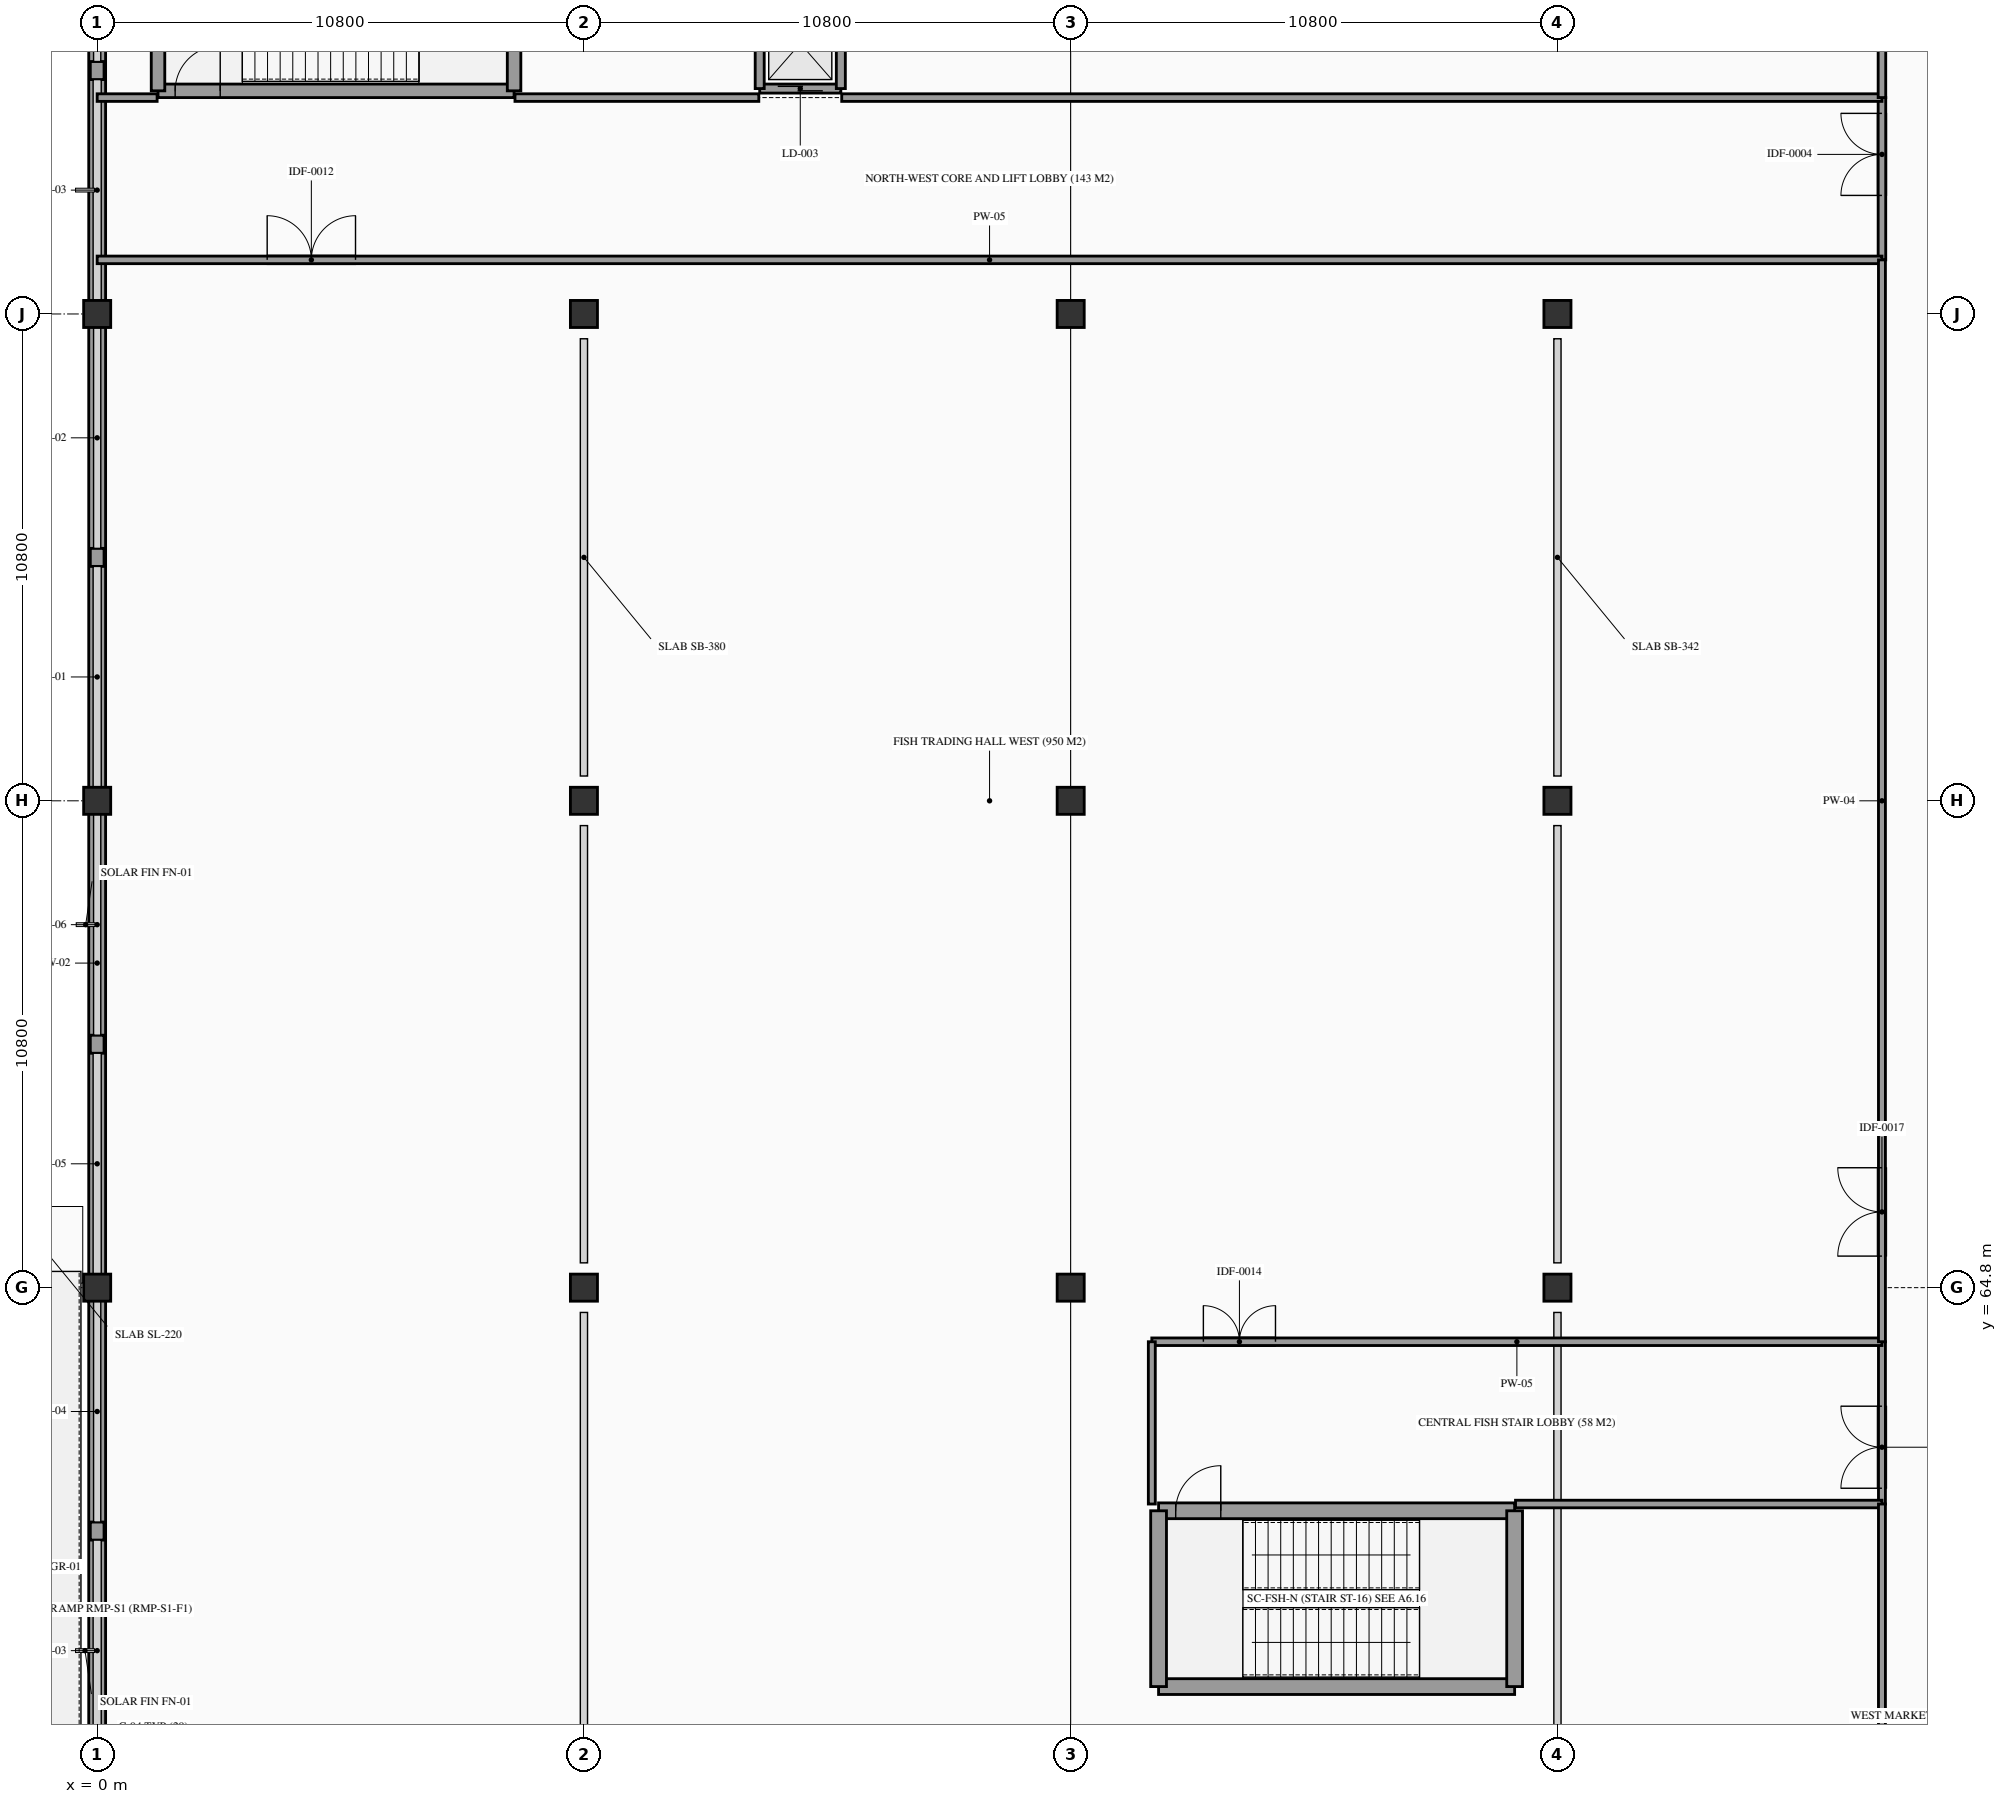
"""IFC4 building model, lengths in metres.
Left out: names, types, materials, properties, quantities, classifications, styles, units other than length and angle.
Written with IfcOpenShell. Run it as: python <this file> out.ifc"""

import sys

from ifc_helpers import new_model, si_unit, direction, frame, frame_2d, origin, origin_2d, place, context, subcontext, project, spatial, rectangle, extrude, element, fill, save


model = new_model("IFC4")
c1 = context("Model", 3, precision=1e-05, world=origin(), true_north=direction((0.0, 1.0)))
c2 = subcontext(c1, "Body", "Model", "MODEL_VIEW")
j1 = project(units=[si_unit("LENGTHUNIT", "METRE"), si_unit("PLANEANGLEUNIT", "RADIAN")], contexts=[c1])
p1 = place(None, origin())
s1 = spatial("IfcSite", under=j1, at=p1, CompositionType="ELEMENT")
p2 = place(p1, origin())
s2 = spatial("IfcBuilding", under=s1, at=p2, CompositionType="ELEMENT")
p3 = place(p2, origin())
s3 = spatial("IfcBuildingStorey", under=s2, at=p3, CompositionType="ELEMENT", Elevation=0.0)
for number, where, z_axis, x_axis in (
    (1, (0.0, 64.8, -1.2), (0.0, 0.0, 1.0), (1.0, 0.0, 0.0)),
    (2, (0.0, 75.6, -1.2), (0.0, 0.0, 1.0), (1.0, 0.0, 0.0)),
    (3, (0.0, 86.4, -1.2), (0.0, 0.0, 1.0), (1.0, 0.0, 0.0)),
    (4, (10.8, 64.8, -1.2), (0.0, 0.0, 1.0), (1.0, 0.0, 0.0)),
    (5, (10.8, 75.6, -1.2), (0.0, 0.0, 1.0), (1.0, 0.0, 0.0)),
    (6, (10.8, 86.4, -1.2), (0.0, 0.0, 1.0), (1.0, 0.0, 0.0)),
    (7, (21.6, 64.8, -1.2), (0.0, 0.0, 1.0), (1.0, 0.0, 0.0)),
    (8, (21.6, 75.6, -1.2), (0.0, 0.0, 1.0), (1.0, 0.0, 0.0)),
    (9, (21.6, 86.4, -1.2), (0.0, 0.0, 1.0), (1.0, 0.0, 0.0)),
    (10, (32.4, 64.8, -1.2), (0.0, 0.0, 1.0), (1.0, 0.0, 0.0)),
    (11, (32.4, 75.6, -1.2), (0.0, 0.0, 1.0), (1.0, 0.0, 0.0)),
    (12, (32.4, 86.4, -1.2), (0.0, 0.0, 1.0), (1.0, 0.0, 0.0)),
):
    element("IfcColumn", number, at=place(p3, frame(where, z_axis=z_axis, x_axis=x_axis)), inside=s3, PredefinedType="COLUMN", context=c2, shape_type="SweptSolid", body=[
        extrude(rectangle(XDim=0.6, YDim=0.6, at=origin_2d()), origin(), (0.0, 0.0, 1.0), 6.6),
    ])
p4 = place(p3, frame((0.0, 0.45, -1.2), z_axis=(0.0, 0.0, 1.0), x_axis=(0.0, 1.0, 0.0)))
e13 = element("IfcWall", 13, at=p4, inside=s3, PredefinedType="USERDEFINED", context=c2, shape_type="SweptSolid", body=[
    extrude(rectangle(XDim=128.7, YDim=0.374, at=frame_2d((64.35, 0.0))), origin(), (0.0, 0.0, 1.0), 0.14),
])
p5 = place(p3, frame((0.0, 59.2, 0.0), z_axis=(0.0, 0.0, 1.0), x_axis=(0.0, 1.0, 0.0)))
e14 = element("IfcWall", 14, at=p5, inside=s3, PredefinedType="STANDARD", context=c2, shape_type="SweptSolid", body=[
    extrude(rectangle(XDim=0.4, YDim=0.305, at=frame_2d((0.2, 0.0))), origin(), (0.0, 0.0, 1.0), 4.198),
])
for number, where, z_axis, x_axis in (
    (15, (0.0, 70.0, 0.0), (0.0, 0.0, 1.0), (0.0, 1.0, 0.0)),
    (16, (0.0, 80.8, 0.0), (0.0, 0.0, 1.0), (0.0, 1.0, 0.0)),
    (17, (0.0, 91.6, 0.0), (0.0, 0.0, 1.0), (0.0, 1.0, 0.0)),
):
    element("IfcWall", number, at=place(p3, frame(where, z_axis=z_axis, x_axis=x_axis)), inside=s3, PredefinedType="STANDARD", context=c2, shape_type="SweptSolid", body=[
        extrude(rectangle(XDim=0.4, YDim=0.305, at=frame_2d((0.2, 0.0))), origin(), (0.0, 0.0, 1.0), 4.25),
    ])
p6 = place(p3, frame((1.35, 91.35, 0.0), z_axis=(0.0, 0.0, 1.0), x_axis=(1.0, 0.0, 0.0)))
e18 = element("IfcWall", 18, at=p6, inside=s3, PredefinedType="SHEAR", context=c2, shape_type="SweptSolid", body=[
    extrude(rectangle(XDim=7.9, YDim=0.3, at=frame_2d((3.95, 0.0))), origin(), (0.0, 0.0, 1.0), 5.4),
])
p7 = place(p6, frame((0.38, 0.0, 0.0)))
e19 = element("IfcOpeningElement", 19, at=p7, cuts=e18, PredefinedType="OPENING", context=c2, shape_type="SweptSolid", body=[
    extrude(rectangle(XDim=1.0, YDim=2.15, at=frame_2d((0.5, 1.075))), frame((0.0, 0.16, 0.0), z_axis=(0.0, -1.0, 0.0), x_axis=(1.0, 0.0, 0.0)), (0.0, 0.0, 1.0), 0.32),
])
for number, where, z_axis, x_axis in (
    (20, (1.35, 91.35, 0.0), (0.0, 0.0, 1.0), (0.0, 1.0, 0.0)),
    (21, (9.25, 91.35, 0.0), (0.0, 0.0, 1.0), (0.0, 1.0, 0.0)),
):
    element("IfcWall", number, at=place(p3, frame(where, z_axis=z_axis, x_axis=x_axis)), inside=s3, PredefinedType="SHEAR", context=c2, shape_type="SweptSolid", body=[
        extrude(rectangle(XDim=3.9, YDim=0.3, at=frame_2d((1.95, 0.0))), origin(), (0.0, 0.0, 1.0), 5.4),
    ])
p8 = place(p3, frame((23.55, 55.95, 0.0), z_axis=(0.0, 0.0, 1.0), x_axis=(1.0, 0.0, 0.0)))
e22 = element("IfcWall", 22, at=p8, inside=s3, PredefinedType="SHEAR", context=c2, shape_type="SweptSolid", body=[
    extrude(rectangle(XDim=7.9, YDim=0.35, at=frame_2d((3.95, 0.0))), origin(), (0.0, 0.0, 1.0), 5.4),
])
p9 = place(p3, frame((23.55, 59.85, 0.0), z_axis=(0.0, 0.0, 1.0), x_axis=(1.0, 0.0, 0.0)))
e23 = element("IfcWall", 23, at=p9, inside=s3, PredefinedType="SHEAR", context=c2, shape_type="SweptSolid", body=[
    extrude(rectangle(XDim=7.9, YDim=0.35, at=frame_2d((3.95, 0.0))), origin(), (0.0, 0.0, 1.0), 5.4),
])
p10 = place(p9, frame((0.38, 0.0, 0.0)))
e24 = element("IfcOpeningElement", 24, at=p10, cuts=e23, PredefinedType="OPENING", context=c2, shape_type="SweptSolid", body=[
    extrude(rectangle(XDim=1.0, YDim=2.15, at=frame_2d((0.5, 1.075))), frame((0.0, 0.185, 0.0), z_axis=(0.0, -1.0, 0.0), x_axis=(1.0, 0.0, 0.0)), (0.0, 0.0, 1.0), 0.37),
])
for number, where, z_axis, x_axis in (
    (25, (23.55, 55.95, 0.0), (0.0, 0.0, 1.0), (0.0, 1.0, 0.0)),
    (26, (31.45, 55.95, 0.0), (0.0, 0.0, 1.0), (0.0, 1.0, 0.0)),
):
    element("IfcWall", number, at=place(p3, frame(where, z_axis=z_axis, x_axis=x_axis)), inside=s3, PredefinedType="SHEAR", context=c2, shape_type="SweptSolid", body=[
        extrude(rectangle(XDim=3.9, YDim=0.35, at=frame_2d((1.95, 0.0))), origin(), (0.0, 0.0, 1.0), 5.4),
    ])
p11 = place(p3, frame((14.7, 91.4, 0.0), z_axis=(0.0, 0.0, 1.0), x_axis=(1.0, 0.0, 0.0)))
e27 = element("IfcWall", 27, at=p11, inside=s3, PredefinedType="SOLIDWALL", context=c2, shape_type="SweptSolid", body=[
    extrude(rectangle(XDim=1.8, YDim=0.2, at=frame_2d((0.9, 0.0))), origin(), (0.0, 0.0, 1.0), 4.22),
])
p12 = place(p11, frame((0.4, 0.0, 0.0)))
e28 = element("IfcOpeningElement", 28, at=p12, cuts=e27, PredefinedType="OPENING", context=c2, shape_type="SweptSolid", body=[
    extrude(rectangle(XDim=1.0, YDim=2.15, at=frame_2d((0.5, 1.075))), frame((0.0, 0.11, 0.0), z_axis=(0.0, -1.0, 0.0), x_axis=(1.0, 0.0, 0.0)), (0.0, 0.0, 1.0), 0.22),
])
for number, where, z_axis, x_axis in (
    (29, (14.7, 91.4, 0.0), (0.0, 0.0, 1.0), (0.0, 1.0, 0.0)),
    (30, (16.5, 91.4, 0.0), (0.0, 0.0, 1.0), (0.0, 1.0, 0.0)),
):
    element("IfcWall", number, at=place(p3, frame(where, z_axis=z_axis, x_axis=x_axis)), inside=s3, PredefinedType="SOLIDWALL", context=c2, shape_type="SweptSolid", body=[
        extrude(rectangle(XDim=2.0, YDim=0.2, at=frame_2d((1.0, 0.0))), origin(), (0.0, 0.0, 1.0), 4.22),
    ])
p13 = place(p3, frame((39.6, 60.0, 0.0), z_axis=(0.0, 0.0, 1.0), x_axis=(0.0, 1.0, 0.0)))
e31 = element("IfcWall", 31, at=p13, inside=s3, PredefinedType="PARTITIONING", context=c2, shape_type="SweptSolid", body=[
    extrude(rectangle(XDim=3.6, YDim=0.154, at=frame_2d((1.8, 0.0))), origin(), (0.0, 0.0, 1.0), 3.95),
])
p14 = place(p13, frame((0.35, 0.0, 0.0)))
e32 = element("IfcOpeningElement", 32, at=p14, cuts=e31, PredefinedType="OPENING", context=c2, shape_type="SweptSolid", body=[
    extrude(rectangle(XDim=1.82, YDim=2.25, at=frame_2d((0.91, 1.125))), frame((0.0, 0.087, 0.0), z_axis=(0.0, -1.0, 0.0), x_axis=(1.0, 0.0, 0.0)), (0.0, 0.0, 1.0), 0.174),
])
p15 = place(p3, frame((39.6, 87.6, 0.0), z_axis=(0.0, 0.0, 1.0), x_axis=(0.0, 1.0, 0.0)))
e33 = element("IfcWall", 33, at=p15, inside=s3, PredefinedType="PARTITIONING", context=c2, shape_type="SweptSolid", body=[
    extrude(rectangle(XDim=3.6, YDim=0.168, at=frame_2d((1.8, 0.0))), origin(), (0.0, 0.0, 1.0), 3.95),
])
p16 = place(p15, frame((1.43, 0.0, 0.0)))
e34 = element("IfcOpeningElement", 34, at=p16, cuts=e33, PredefinedType="OPENING", context=c2, shape_type="SweptSolid", body=[
    extrude(rectangle(XDim=1.82, YDim=2.25, at=frame_2d((0.91, 1.125))), frame((0.0, 0.094, 0.0), z_axis=(0.0, -1.0, 0.0), x_axis=(1.0, 0.0, 0.0)), (0.0, 0.0, 1.0), 0.188),
])
p17 = place(p3, frame((0.0, 87.6, 0.0), z_axis=(0.0, 0.0, 1.0), x_axis=(1.0, 0.0, 0.0)))
e35 = element("IfcWall", 35, at=p17, inside=s3, PredefinedType="PARTITIONING", context=c2, shape_type="SweptSolid", body=[
    extrude(rectangle(XDim=39.6, YDim=0.168, at=frame_2d((19.8, 0.0))), origin(), (0.0, 0.0, 1.0), 3.95),
])
p18 = place(p17, frame((3.772, 0.0, 0.0)))
e36 = element("IfcOpeningElement", 36, at=p18, cuts=e35, PredefinedType="OPENING", context=c2, shape_type="SweptSolid", body=[
    extrude(rectangle(XDim=1.96, YDim=2.3, at=frame_2d((0.98, 1.15))), frame((0.0, 0.094, 0.0), z_axis=(0.0, -1.0, 0.0), x_axis=(1.0, 0.0, 0.0)), (0.0, 0.0, 1.0), 0.188),
])
p19 = place(p3, frame((23.4, 63.6, 0.0), z_axis=(0.0, 0.0, 1.0), x_axis=(1.0, 0.0, 0.0)))
e37 = element("IfcWall", 37, at=p19, inside=s3, PredefinedType="PARTITIONING", context=c2, shape_type="SweptSolid", body=[
    extrude(rectangle(XDim=16.2, YDim=0.168, at=frame_2d((8.1, 0.0))), origin(), (0.0, 0.0, 1.0), 3.95),
])
p20 = place(p19, frame((1.144, 0.0, 0.0)))
e38 = element("IfcOpeningElement", 38, at=p20, cuts=e37, PredefinedType="OPENING", context=c2, shape_type="SweptSolid", body=[
    extrude(rectangle(XDim=1.6, YDim=2.2, at=frame_2d((0.8, 1.1))), frame((0.0, 0.094, 0.0), z_axis=(0.0, -1.0, 0.0), x_axis=(1.0, 0.0, 0.0)), (0.0, 0.0, 1.0), 0.188),
])
p21 = place(p3, frame((39.6, 63.6, 0.0), z_axis=(0.0, 0.0, 1.0), x_axis=(0.0, 1.0, 0.0)))
e39 = element("IfcWall", 39, at=p21, inside=s3, PredefinedType="PARTITIONING", context=c2, shape_type="SweptSolid", body=[
    extrude(rectangle(XDim=24.0, YDim=0.154, at=frame_2d((12.0, 0.0))), origin(), (0.0, 0.0, 1.0), 3.95),
])
p22 = place(p21, frame((1.9, 0.0, 0.0)))
e40 = element("IfcOpeningElement", 40, at=p22, cuts=e39, PredefinedType="OPENING", context=c2, shape_type="SweptSolid", body=[
    extrude(rectangle(XDim=1.96, YDim=2.3, at=frame_2d((0.98, 1.15))), frame((0.0, 0.087, 0.0), z_axis=(0.0, -1.0, 0.0), x_axis=(1.0, 0.0, 0.0)), (0.0, 0.0, 1.0), 0.174),
])
p23 = place(p3, frame((0.0, 91.2, 0.0), z_axis=(0.0, 0.0, 1.0), x_axis=(1.0, 0.0, 0.0)))
e41 = element("IfcWall", 41, at=p23, inside=s3, PredefinedType="PARTITIONING", context=c2, shape_type="SweptSolid", body=[
    extrude(rectangle(XDim=1.33, YDim=0.168, at=frame_2d((0.665, 0.0))), origin(), (0.0, 0.0, 1.0), 3.95),
])
p24 = place(p3, frame((9.27, 91.2, 0.0), z_axis=(0.0, 0.0, 1.0), x_axis=(1.0, 0.0, 0.0)))
e42 = element("IfcWall", 42, at=p24, inside=s3, PredefinedType="PARTITIONING", context=c2, shape_type="SweptSolid", body=[
    extrude(rectangle(XDim=5.41, YDim=0.168, at=frame_2d((2.705, 0.0))), origin(), (0.0, 0.0, 1.0), 3.95),
])
p25 = place(p3, frame((16.52, 91.2, 0.0), z_axis=(0.0, 0.0, 1.0), x_axis=(1.0, 0.0, 0.0)))
e43 = element("IfcWall", 43, at=p25, inside=s3, PredefinedType="PARTITIONING", context=c2, shape_type="SweptSolid", body=[
    extrude(rectangle(XDim=23.08, YDim=0.168, at=frame_2d((11.54, 0.0))), origin(), (0.0, 0.0, 1.0), 3.95),
])
p26 = place(p3, frame((31.47, 60.0, 0.0), z_axis=(0.0, 0.0, 1.0), x_axis=(1.0, 0.0, 0.0)))
e44 = element("IfcWall", 44, at=p26, inside=s3, PredefinedType="PARTITIONING", context=c2, shape_type="SweptSolid", body=[
    extrude(rectangle(XDim=8.13, YDim=0.168, at=frame_2d((4.065, 0.0))), origin(), (0.0, 0.0, 1.0), 3.95),
])
p27 = place(p3, frame((23.4, 60.0, 0.0), z_axis=(0.0, 0.0, 1.0), x_axis=(0.0, 1.0, 0.0)))
e45 = element("IfcWall", 45, at=p27, inside=s3, PredefinedType="PARTITIONING", context=c2, shape_type="SweptSolid", body=[
    extrude(rectangle(XDim=3.6, YDim=0.154, at=frame_2d((1.8, 0.0))), origin(), (0.0, 0.0, 1.0), 3.95),
])
p28 = place(p3, frame((39.6, 54.0, 0.0), z_axis=(0.0, 0.0, 1.0), x_axis=(0.0, 1.0, 0.0)))
e46 = element("IfcWall", 46, at=p28, inside=s3, PredefinedType="PARTITIONING", context=c2, shape_type="SweptSolid", body=[
    extrude(rectangle(XDim=6.0, YDim=0.154, at=frame_2d((3.0, 0.0))), origin(), (0.0, 0.0, 1.0), 3.95),
])
p29 = place(p3, frame((39.6, 91.2, 0.0), z_axis=(0.0, 0.0, 1.0), x_axis=(0.0, 1.0, 0.0)))
e47 = element("IfcWall", 47, at=p29, inside=s3, PredefinedType="PARTITIONING", context=c2, shape_type="SweptSolid", body=[
    extrude(rectangle(XDim=6.0, YDim=0.168, at=frame_2d((3.0, 0.0))), origin(), (0.0, 0.0, 1.0), 3.95),
])
p30 = place(p7, origin())
e48 = element("IfcDoor", 48, at=p30, inside=s3, OperationType="SINGLE_SWING_RIGHT", PredefinedType="DOOR", context=c2, shape_type="SweptSolid", body=[
    extrude(rectangle(XDim=1.0, YDim=2.15, at=frame_2d((0.5, 1.075))), frame((0.0, 0.025, 0.0), z_axis=(0.0, -1.0, 0.0), x_axis=(1.0, 0.0, 0.0)), (0.0, 0.0, 1.0), 0.05),
])
fill(e19, e48)
p31 = place(p10, frame((1.0, 0.0, 0.0), z_axis=(0.0, 0.0, 1.0), x_axis=(-1.0, 0.0, 0.0)))
e49 = element("IfcDoor", 49, at=p31, inside=s3, OperationType="SINGLE_SWING_RIGHT", PredefinedType="DOOR", context=c2, shape_type="SweptSolid", body=[
    extrude(rectangle(XDim=1.0, YDim=2.15, at=frame_2d((0.5, 1.075))), frame((0.0, 0.025, 0.0), z_axis=(0.0, -1.0, 0.0), x_axis=(1.0, 0.0, 0.0)), (0.0, 0.0, 1.0), 0.05),
])
fill(e24, e49)
p32 = place(p12, origin())
e50 = element("IfcDoor", 50, at=p32, inside=s3, OperationType="DOUBLE_DOOR_SLIDING", PredefinedType="DOOR", context=c2, shape_type="SweptSolid", body=[
    extrude(rectangle(XDim=1.0, YDim=2.15, at=frame_2d((0.5, 1.075))), frame((0.0, 0.025, 0.0), z_axis=(0.0, -1.0, 0.0), x_axis=(1.0, 0.0, 0.0)), (0.0, 0.0, 1.0), 0.05),
])
fill(e28, e50)
p33 = place(p14, frame((1.82, 0.0, 0.0), z_axis=(0.0, 0.0, 1.0), x_axis=(-1.0, 0.0, 0.0)))
e51 = element("IfcDoor", 51, at=p33, inside=s3, OperationType="DOUBLE_DOOR_SINGLE_SWING", PredefinedType="DOOR", context=c2, shape_type="SweptSolid", body=[
    extrude(rectangle(XDim=1.82, YDim=2.25, at=frame_2d((0.91, 1.125))), frame((0.0, 0.025, 0.0), z_axis=(0.0, -1.0, 0.0), x_axis=(1.0, 0.0, 0.0)), (0.0, 0.0, 1.0), 0.05),
])
fill(e32, e51)
p34 = place(p16, origin())
e52 = element("IfcDoor", 52, at=p34, inside=s3, OperationType="DOUBLE_DOOR_SINGLE_SWING", PredefinedType="DOOR", context=c2, shape_type="SweptSolid", body=[
    extrude(rectangle(XDim=1.82, YDim=2.25, at=frame_2d((0.91, 1.125))), frame((0.0, 0.025, 0.0), z_axis=(0.0, -1.0, 0.0), x_axis=(1.0, 0.0, 0.0)), (0.0, 0.0, 1.0), 0.05),
])
fill(e34, e52)
p35 = place(p18, frame((1.96, 0.0, 0.0), z_axis=(0.0, 0.0, 1.0), x_axis=(-1.0, 0.0, 0.0)))
e53 = element("IfcDoor", 53, at=p35, inside=s3, OperationType="DOUBLE_DOOR_SINGLE_SWING", PredefinedType="DOOR", context=c2, shape_type="SweptSolid", body=[
    extrude(rectangle(XDim=1.96, YDim=2.3, at=frame_2d((0.98, 1.15))), frame((0.0, 0.025, 0.0), z_axis=(0.0, -1.0, 0.0), x_axis=(1.0, 0.0, 0.0)), (0.0, 0.0, 1.0), 0.05),
])
fill(e36, e53)
p36 = place(p20, origin())
e54 = element("IfcDoor", 54, at=p36, inside=s3, OperationType="DOUBLE_DOOR_SINGLE_SWING", PredefinedType="DOOR", context=c2, shape_type="SweptSolid", body=[
    extrude(rectangle(XDim=1.6, YDim=2.2, at=frame_2d((0.8, 1.1))), frame((0.0, 0.025, 0.0), z_axis=(0.0, -1.0, 0.0), x_axis=(1.0, 0.0, 0.0)), (0.0, 0.0, 1.0), 0.05),
])
fill(e38, e54)
p37 = place(p22, origin())
e55 = element("IfcDoor", 55, at=p37, inside=s3, OperationType="DOUBLE_DOOR_SINGLE_SWING", PredefinedType="DOOR", context=c2, shape_type="SweptSolid", body=[
    extrude(rectangle(XDim=1.96, YDim=2.3, at=frame_2d((0.98, 1.15))), frame((0.0, 0.025, 0.0), z_axis=(0.0, -1.0, 0.0), x_axis=(1.0, 0.0, 0.0)), (0.0, 0.0, 1.0), 0.05),
])
fill(e40, e55)
save(model, sys.argv[1])
